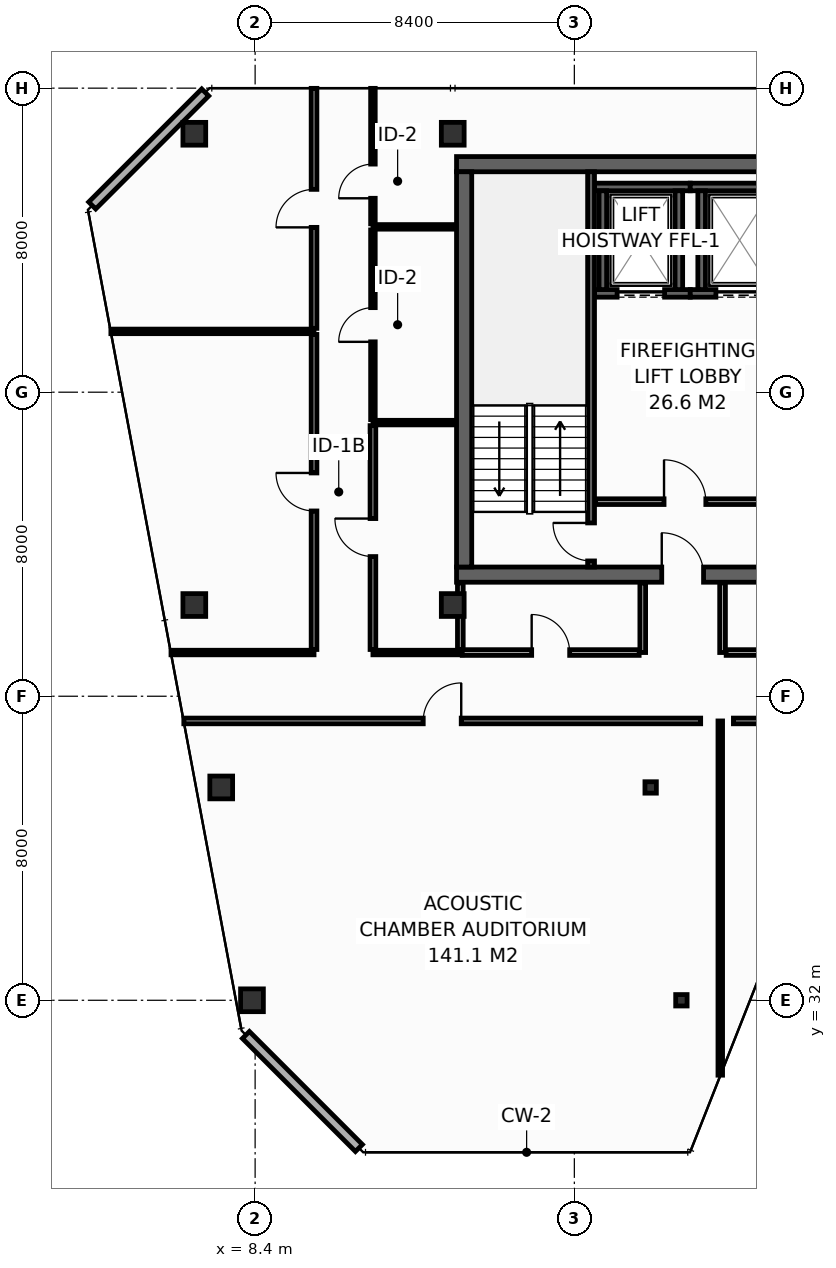
"""IFC4 building model, lengths in metres.
Left out: names, types, materials, properties, quantities, classifications, styles, units other than length and angle.
Written with IfcOpenShell. Run it as: python <this file> out.ifc"""

import sys

from ifc_helpers import new_model, si_unit, direction, frame, frame_2d, origin, origin_2d, place, context, subcontext, project, spatial, rectangle, hollow_rectangle, extrude, element, fill, save


model = new_model("IFC4")
c1 = context("Model", 3, precision=1e-05, world=origin(), true_north=direction((0.0, 1.0)))
c2 = subcontext(c1, "Body", "Model", "MODEL_VIEW")
j1 = project(units=[si_unit("LENGTHUNIT", "METRE"), si_unit("PLANEANGLEUNIT", "RADIAN")], contexts=[c1])
p1 = place(None, origin())
s1 = spatial("IfcSite", under=j1, at=p1, CompositionType="ELEMENT")
p2 = place(p1, origin())
s2 = spatial("IfcBuilding", under=s1, at=p2, CompositionType="ELEMENT")
p3 = place(p2, frame((0.0, 0.0, 291.4)))
s3 = spatial("IfcBuildingStorey", under=s2, at=p3, CompositionType="ELEMENT", Elevation=291.4)
p4 = place(p3, frame((13.7, 43.2, 0.0), z_axis=(0.0, 0.0, 1.0), x_axis=(1.0, 0.0, 0.0)))
e1 = element("IfcWall", 1, at=p4, inside=s3, PredefinedType="SHEAR", context=c2, shape_type="SweptSolid", body=[
    extrude(rectangle(XDim=32.5, YDim=0.4, at=frame_2d((16.25, 0.0))), origin(), (0.0, 0.0, 1.0), 3.55),
])
p5 = place(p4, frame((5.4, 0.0, 0.0)))
e2 = element("IfcOpeningElement", 2, at=p5, cuts=e1, PredefinedType="OPENING", context=c2, shape_type="SweptSolid", body=[
    extrude(rectangle(XDim=1.1, YDim=2.15, at=frame_2d((0.55, 1.075))), frame((0.0, 0.21, 0.0), z_axis=(0.0, -1.0, 0.0), x_axis=(1.0, 0.0, 0.0)), (0.0, 0.0, 1.0), 0.42),
])
p6 = place(p4, frame((25.6, 0.0, 0.0)))
e3 = element("IfcOpeningElement", 3, at=p6, cuts=e1, PredefinedType="OPENING", context=c2, shape_type="SweptSolid", body=[
    extrude(rectangle(XDim=1.1, YDim=2.15, at=frame_2d((0.55, 1.075))), frame((0.0, 0.21, 0.0), z_axis=(0.0, -1.0, 0.0), x_axis=(1.0, 0.0, 0.0)), (0.0, 0.0, 1.0), 0.42),
])
p7 = place(p3, frame((13.7, 54.0, 0.0), z_axis=(0.0, 0.0, 1.0), x_axis=(1.0, 0.0, 0.0)))
e4 = element("IfcWall", 4, at=p7, inside=s3, PredefinedType="SHEAR", context=c2, shape_type="SweptSolid", body=[
    extrude(rectangle(XDim=32.5, YDim=0.4, at=frame_2d((16.25, 0.0))), origin(), (0.0, 0.0, 1.0), 3.55),
])
p8 = place(p3, frame((13.9, 43.4, 0.0), z_axis=(0.0, 0.0, 1.0), x_axis=(0.0, 1.0, 0.0)))
e5 = element("IfcWall", 5, at=p8, inside=s3, PredefinedType="SHEAR", context=c2, shape_type="SweptSolid", body=[
    extrude(rectangle(XDim=10.4, YDim=0.4, at=frame_2d((5.2, 0.0))), origin(), (0.0, 0.0, 1.0), 3.55),
])
for number, where, z_axis, x_axis in (
    (6, (6.8, 54.8, 0.0), (0.0, 0.0, 1.0), (1.0, 0.0, 0.0)),
    (7, (13.6, 54.8, 0.0), (0.0, 0.0, 1.0), (1.0, 0.0, 0.0)),
    (8, (6.8, 42.4, 0.0), (0.0, 0.0, 1.0), (1.0, 0.0, 0.0)),
    (9, (13.6, 42.4, 0.0), (0.0, 0.0, 1.0), (1.0, 0.0, 0.0)),
    (10, (8.317, 32.0, 0.0), (0.0, 0.0, 1.0), (1.0, 0.0, 0.0)),
):
    element("IfcColumn", number, at=place(p3, frame(where, z_axis=z_axis, x_axis=x_axis)), inside=s3, PredefinedType="COLUMN", context=c2, shape_type="SweptSolid", body=[
        extrude(hollow_rectangle(XDim=0.6, YDim=0.6, WallThickness=0.028, at=origin_2d()), origin(), (0.0, 0.0, 1.0), 3.8),
    ])
p9 = place(p3, frame((19.617, 32.0, 0.0), z_axis=(0.0, 0.0, 1.0), x_axis=(1.0, 0.0, 0.0)))
e11 = element("IfcColumn", 11, at=p9, inside=s3, PredefinedType="COLUMN", context=c2, shape_type="SweptSolid", body=[
    extrude(hollow_rectangle(XDim=0.3, YDim=0.3, WallThickness=0.012, at=origin_2d()), origin(), (0.0, 0.0, 1.0), 3.8),
])
p10 = place(p3, frame((7.508, 37.6, 0.0), z_axis=(0.0, 0.0, 1.0), x_axis=(1.0, 0.0, 0.0)))
e12 = element("IfcColumn", 12, at=p10, inside=s3, PredefinedType="COLUMN", context=c2, shape_type="SweptSolid", body=[
    extrude(hollow_rectangle(XDim=0.6, YDim=0.6, WallThickness=0.028, at=origin_2d()), origin(), (0.0, 0.0, 1.0), 3.8),
])
p11 = place(p3, frame((18.808, 37.6, 0.0), z_axis=(0.0, 0.0, 1.0), x_axis=(1.0, 0.0, 0.0)))
e13 = element("IfcColumn", 13, at=p11, inside=s3, PredefinedType="COLUMN", context=c2, shape_type="SweptSolid", body=[
    extrude(hollow_rectangle(XDim=0.3, YDim=0.3, WallThickness=0.012, at=origin_2d()), origin(), (0.0, 0.0, 1.0), 3.8),
])
p12 = place(p3, frame((17.33, 50.6, 0.0), z_axis=(0.0, 0.0, 1.0), x_axis=(1.0, 0.0, 0.0)))
e14 = element("IfcWall", 14, at=p12, inside=s3, PredefinedType="SHEAR", context=c2, shape_type="SweptSolid", body=[
    extrude(rectangle(XDim=2.52, YDim=0.2, at=frame_2d((1.26, 0.0))), origin(), (0.0, 0.0, 1.0), 3.55),
])
p13 = place(p12, frame((0.595, 0.0, 0.0)))
e15 = element("IfcOpeningElement", 15, at=p13, cuts=e14, PredefinedType="OPENING", context=c2, shape_type="SweptSolid", body=[
    extrude(rectangle(XDim=1.25, YDim=2.3, at=frame_2d((0.625, 1.15))), frame((0.0, 0.11, 0.0), z_axis=(0.0, -1.0, 0.0), x_axis=(1.0, 0.0, 0.0)), (0.0, 0.0, 1.0), 0.22),
])
p14 = place(p3, frame((17.33, 53.4, 0.0), z_axis=(0.0, 0.0, 1.0), x_axis=(1.0, 0.0, 0.0)))
e16 = element("IfcWall", 16, at=p14, inside=s3, PredefinedType="SHEAR", context=c2, shape_type="SweptSolid", body=[
    extrude(rectangle(XDim=2.52, YDim=0.2, at=frame_2d((1.26, 0.0))), origin(), (0.0, 0.0, 1.0), 3.55),
])
for number, where, z_axis, x_axis in (
    (17, (17.55, 50.7, 0.0), (0.0, 0.0, 1.0), (0.0, 1.0, 0.0)),
    (18, (19.55, 50.7, 0.0), (0.0, 0.0, 1.0), (0.0, 1.0, 0.0)),
):
    element("IfcWall", number, at=place(p3, frame(where, z_axis=z_axis, x_axis=x_axis)), inside=s3, PredefinedType="SHEAR", context=c2, shape_type="SweptSolid", body=[
        extrude(rectangle(XDim=2.6, YDim=0.2, at=frame_2d((1.3, 0.0))), origin(), (0.0, 0.0, 1.0), 3.55),
    ])
p15 = place(p3, frame((19.85, 50.6, 0.0), z_axis=(0.0, 0.0, 1.0), x_axis=(1.0, 0.0, 0.0)))
e19 = element("IfcWall", 19, at=p15, inside=s3, PredefinedType="SHEAR", context=c2, shape_type="SweptSolid", body=[
    extrude(rectangle(XDim=2.65, YDim=0.2, at=frame_2d((1.325, 0.0))), origin(), (0.0, 0.0, 1.0), 3.55),
])
p16 = place(p15, frame((0.675, 0.0, 0.0)))
e20 = element("IfcOpeningElement", 20, at=p16, cuts=e19, PredefinedType="OPENING", context=c2, shape_type="SweptSolid", body=[
    extrude(rectangle(XDim=1.25, YDim=2.3, at=frame_2d((0.625, 1.15))), frame((0.0, 0.11, 0.0), z_axis=(0.0, -1.0, 0.0), x_axis=(1.0, 0.0, 0.0)), (0.0, 0.0, 1.0), 0.22),
])
p17 = place(p3, frame((19.85, 53.4, 0.0), z_axis=(0.0, 0.0, 1.0), x_axis=(1.0, 0.0, 0.0)))
e21 = element("IfcWall", 21, at=p17, inside=s3, PredefinedType="SHEAR", context=c2, shape_type="SweptSolid", body=[
    extrude(rectangle(XDim=2.65, YDim=0.2, at=frame_2d((1.325, 0.0))), origin(), (0.0, 0.0, 1.0), 3.55),
])
p18 = place(p3, frame((20.15, 50.7, 0.0), z_axis=(0.0, 0.0, 1.0), x_axis=(0.0, 1.0, 0.0)))
e22 = element("IfcWall", 22, at=p18, inside=s3, PredefinedType="SHEAR", context=c2, shape_type="SweptSolid", body=[
    extrude(rectangle(XDim=2.6, YDim=0.2, at=frame_2d((1.3, 0.0))), origin(), (0.0, 0.0, 1.0), 3.55),
])
p19 = place(p3, frame((17.24, 43.4, 0.0), z_axis=(0.0, 0.0, 1.0), x_axis=(0.0, 1.0, 0.0)))
e23 = element("IfcWall", 23, at=p19, inside=s3, PredefinedType="SHEAR", context=c2, shape_type="SweptSolid", body=[
    extrude(rectangle(XDim=10.4, YDim=0.18, at=frame_2d((5.2, 0.0))), origin(), (0.0, 0.0, 1.0), 3.55),
])
p20 = place(p19, frame((0.16, 0.0, 0.0)))
e24 = element("IfcOpeningElement", 24, at=p20, cuts=e23, PredefinedType="OPENING", context=c2, shape_type="SweptSolid", body=[
    extrude(rectangle(XDim=1.0, YDim=2.15, at=frame_2d((0.5, 1.075))), frame((0.0, 0.1, 0.0), z_axis=(0.0, -1.0, 0.0), x_axis=(1.0, 0.0, 0.0)), (0.0, 0.0, 1.0), 0.2),
])
p21 = place(p3, frame((17.36, 45.12, 0.0), z_axis=(0.0, 0.0, 1.0), x_axis=(1.0, 0.0, 0.0)))
e25 = element("IfcWall", 25, at=p21, inside=s3, PredefinedType="PARTITIONING", context=c2, shape_type="SweptSolid", body=[
    extrude(rectangle(XDim=5.14, YDim=0.15, at=frame_2d((2.57, 0.0))), origin(), (0.0, 0.0, 1.0), 3.55),
])
p22 = place(p21, frame((1.8, 0.0, 0.0)))
e26 = element("IfcOpeningElement", 26, at=p22, cuts=e25, PredefinedType="OPENING", context=c2, shape_type="SweptSolid", body=[
    extrude(rectangle(XDim=1.1, YDim=2.15, at=frame_2d((0.55, 1.075))), frame((0.0, 0.085, 0.0), z_axis=(0.0, -1.0, 0.0), x_axis=(1.0, 0.0, 0.0)), (0.0, 0.0, 1.0), 0.17),
])
for number, where, z_axis, x_axis in (
    (27, (8.157, 31.087, 0.0), (0.0, 0.0, 1.0), (0.707, -0.707, 0.0)),
    (28, (7.087, 55.887, 0.0), (0.0, 0.0, 1.0), (-0.707, -0.707, 0.0)),
):
    element("IfcWall", number, at=place(p3, frame(where, z_axis=z_axis, x_axis=x_axis)), inside=s3, PredefinedType="STANDARD", context=c2, shape_type="SweptSolid", body=[
        extrude(rectangle(XDim=4.206, YDim=0.26, at=frame_2d((2.103, 0.0))), origin(), (0.0, 0.0, 1.0), 3.55),
    ])
p23 = place(p3, frame((6.186, 41.15, 0.0), z_axis=(0.0, 0.0, 1.0), x_axis=(1.0, 0.0, 0.0)))
e29 = element("IfcWall", 29, at=p23, inside=s3, PredefinedType="PARTITIONING", context=c2, shape_type="SweptSolid", body=[
    extrude(rectangle(XDim=3.764, YDim=0.12, at=frame_2d((1.882, 0.0))), origin(), (0.0, 0.0, 1.0), 3.085),
])
p24 = place(p3, frame((11.5, 41.15, 0.0), z_axis=(0.0, 0.0, 1.0), x_axis=(1.0, 0.0, 0.0)))
e30 = element("IfcWall", 30, at=p24, inside=s3, PredefinedType="PARTITIONING", context=c2, shape_type="SweptSolid", body=[
    extrude(rectangle(XDim=2.35, YDim=0.12, at=frame_2d((1.175, 0.0))), origin(), (0.0, 0.0, 1.0), 3.55),
])
p25 = place(p3, frame((11.5, 52.35, 0.0), z_axis=(0.0, 0.0, 1.0), x_axis=(1.0, 0.0, 0.0)))
e31 = element("IfcWall", 31, at=p25, inside=s3, PredefinedType="PARTITIONING", context=c2, shape_type="SweptSolid", body=[
    extrude(rectangle(XDim=2.18, YDim=0.12, at=frame_2d((1.09, 0.0))), origin(), (0.0, 0.0, 1.0), 3.55),
])
p26 = place(p3, frame((11.5, 52.43, 0.0), z_axis=(0.0, 0.0, 1.0), x_axis=(0.0, 1.0, 0.0)))
e32 = element("IfcWall", 32, at=p26, inside=s3, PredefinedType="PARTITIONING", context=c2, shape_type="SweptSolid", body=[
    extrude(rectangle(XDim=3.565, YDim=0.12, at=frame_2d((1.783, 0.0))), origin(), (0.0, 0.0, 1.0), 2.935),
])
p27 = place(p26, frame((0.672, 0.0, 0.0)))
e33 = element("IfcOpeningElement", 33, at=p27, cuts=e32, PredefinedType="OPENING", context=c2, shape_type="SweptSolid", body=[
    extrude(rectangle(XDim=0.9, YDim=2.1, at=frame_2d((0.45, 1.05))), frame((0.0, 0.07, 0.0), z_axis=(0.0, -1.0, 0.0), x_axis=(1.0, 0.0, 0.0)), (0.0, 0.0, 1.0), 0.14),
])
p28 = place(p3, frame((4.604, 49.6, 0.0), z_axis=(0.0, 0.0, 1.0), x_axis=(1.0, 0.0, 0.0)))
e34 = element("IfcWall", 34, at=p28, inside=s3, PredefinedType="PARTITIONING", context=c2, shape_type="SweptSolid", body=[
    extrude(rectangle(XDim=5.346, YDim=0.12, at=frame_2d((2.673, 0.0))), origin(), (0.0, 0.0, 1.0), 2.947),
])
p29 = place(p3, frame((9.95, 41.23, 0.0), z_axis=(0.0, 0.0, 1.0), x_axis=(0.0, 1.0, 0.0)))
e35 = element("IfcWall", 35, at=p29, inside=s3, PredefinedType="PARTITIONING", context=c2, shape_type="SweptSolid", body=[
    extrude(rectangle(XDim=8.29, YDim=0.15, at=frame_2d((4.145, 0.0))), origin(), (0.0, 0.0, 1.0), 2.947),
])
p30 = place(p29, frame((3.645, 0.0, 0.0)))
e36 = element("IfcOpeningElement", 36, at=p30, cuts=e35, PredefinedType="OPENING", context=c2, shape_type="SweptSolid", body=[
    extrude(rectangle(XDim=1.0, YDim=2.15, at=frame_2d((0.5, 1.075))), frame((0.0, 0.085, 0.0), z_axis=(0.0, -1.0, 0.0), x_axis=(1.0, 0.0, 0.0)), (0.0, 0.0, 1.0), 0.17),
])
p31 = place(p3, frame((9.95, 49.68, 0.0), z_axis=(0.0, 0.0, 1.0), x_axis=(0.0, 1.0, 0.0)))
e37 = element("IfcWall", 37, at=p31, inside=s3, PredefinedType="PARTITIONING", context=c2, shape_type="SweptSolid", body=[
    extrude(rectangle(XDim=6.315, YDim=0.15, at=frame_2d((3.158, 0.0))), origin(), (0.0, 0.0, 1.0), 2.935),
])
p32 = place(p31, frame((2.657, 0.0, 0.0)))
e38 = element("IfcOpeningElement", 38, at=p32, cuts=e37, PredefinedType="OPENING", context=c2, shape_type="SweptSolid", body=[
    extrude(rectangle(XDim=1.0, YDim=2.15, at=frame_2d((0.5, 1.075))), frame((0.0, 0.085, 0.0), z_axis=(0.0, -1.0, 0.0), x_axis=(1.0, 0.0, 0.0)), (0.0, 0.0, 1.0), 0.17),
])
p33 = place(p3, frame((11.5, 47.2, 0.0), z_axis=(0.0, 0.0, 1.0), x_axis=(1.0, 0.0, 0.0)))
e39 = element("IfcWall", 39, at=p33, inside=s3, PredefinedType="PARTITIONING", context=c2, shape_type="SweptSolid", body=[
    extrude(rectangle(XDim=2.18, YDim=0.12, at=frame_2d((1.09, 0.0))), origin(), (0.0, 0.0, 1.0), 3.55),
])
p34 = place(p3, frame((11.5, 41.23, 0.0), z_axis=(0.0, 0.0, 1.0), x_axis=(0.0, 1.0, 0.0)))
e40 = element("IfcWall", 40, at=p34, inside=s3, PredefinedType="PARTITIONING", context=c2, shape_type="SweptSolid", body=[
    extrude(rectangle(XDim=5.89, YDim=0.15, at=frame_2d((2.945, 0.0))), origin(), (0.0, 0.0, 1.0), 2.947),
])
p35 = place(p34, frame((2.445, 0.0, 0.0)))
e41 = element("IfcOpeningElement", 41, at=p35, cuts=e40, PredefinedType="OPENING", context=c2, shape_type="SweptSolid", body=[
    extrude(rectangle(XDim=1.0, YDim=2.15, at=frame_2d((0.5, 1.075))), frame((0.0, 0.085, 0.0), z_axis=(0.0, -1.0, 0.0), x_axis=(1.0, 0.0, 0.0)), (0.0, 0.0, 1.0), 0.17),
])
p36 = place(p3, frame((11.5, 47.28, 0.0), z_axis=(0.0, 0.0, 1.0), x_axis=(0.0, 1.0, 0.0)))
e42 = element("IfcWall", 42, at=p36, inside=s3, PredefinedType="PARTITIONING", context=c2, shape_type="SweptSolid", body=[
    extrude(rectangle(XDim=4.99, YDim=0.12, at=frame_2d((2.495, 0.0))), origin(), (0.0, 0.0, 1.0), 3.55),
])
p37 = place(p36, frame((2.045, 0.0, 0.0)))
e43 = element("IfcOpeningElement", 43, at=p37, cuts=e42, PredefinedType="OPENING", context=c2, shape_type="SweptSolid", body=[
    extrude(rectangle(XDim=0.9, YDim=2.1, at=frame_2d((0.45, 1.05))), frame((0.0, 0.07, 0.0), z_axis=(0.0, -1.0, 0.0), x_axis=(1.0, 0.0, 0.0)), (0.0, 0.0, 1.0), 0.14),
])
p38 = place(p3, frame((13.8, 41.23, 0.0), z_axis=(0.0, 0.0, 1.0), x_axis=(0.0, 1.0, 0.0)))
e44 = element("IfcWall", 44, at=p38, inside=s3, PredefinedType="PARTITIONING", context=c2, shape_type="SweptSolid", body=[
    extrude(rectangle(XDim=1.75, YDim=0.15, at=frame_2d((0.875, 0.0))), origin(), (0.0, 0.0, 1.0), 3.55),
])
for number, where, z_axis, x_axis in (
    (45, (18.6, 41.15, 0.0), (0.0, 0.0, 1.0), (0.0, 1.0, 0.0)),
    (46, (20.7, 41.15, 0.0), (0.0, 0.0, 1.0), (0.0, 1.0, 0.0)),
):
    element("IfcWall", number, at=place(p3, frame(where, z_axis=z_axis, x_axis=x_axis)), inside=s3, PredefinedType="PARTITIONING", context=c2, shape_type="SweptSolid", body=[
        extrude(rectangle(XDim=1.83, YDim=0.15, at=frame_2d((0.915, 0.0))), origin(), (0.0, 0.0, 1.0), 3.55),
    ])
p39 = place(p3, frame((13.85, 41.15, 0.0), z_axis=(0.0, 0.0, 1.0), x_axis=(1.0, 0.0, 0.0)))
e47 = element("IfcWall", 47, at=p39, inside=s3, PredefinedType="PARTITIONING", context=c2, shape_type="SweptSolid", body=[
    extrude(rectangle(XDim=4.655, YDim=0.15, at=frame_2d((2.327, 0.0))), origin(), (0.0, 0.0, 1.0), 3.55),
])
p40 = place(p39, frame((1.827, 0.0, 0.0)))
e48 = element("IfcOpeningElement", 48, at=p40, cuts=e47, PredefinedType="OPENING", context=c2, shape_type="SweptSolid", body=[
    extrude(rectangle(XDim=1.0, YDim=2.15, at=frame_2d((0.5, 1.075))), frame((0.0, 0.085, 0.0), z_axis=(0.0, -1.0, 0.0), x_axis=(1.0, 0.0, 0.0)), (0.0, 0.0, 1.0), 0.17),
])
p41 = place(p3, frame((20.795, 41.15, 0.0), z_axis=(0.0, 0.0, 1.0), x_axis=(1.0, 0.0, 0.0)))
e49 = element("IfcWall", 49, at=p41, inside=s3, PredefinedType="PARTITIONING", context=c2, shape_type="SweptSolid", body=[
    extrude(rectangle(XDim=1.126, YDim=0.15, at=frame_2d((0.563, 0.0))), origin(), (0.0, 0.0, 1.0), 3.55),
])
p42 = place(p3, frame((20.64, 30.029, 0.0), z_axis=(0.0, 0.0, 1.0), x_axis=(0.0, 1.0, 0.0)))
e50 = element("IfcWall", 50, at=p42, inside=s3, PredefinedType="PARTITIONING", context=c2, shape_type="SweptSolid", body=[
    extrude(rectangle(XDim=9.321, YDim=0.12, at=frame_2d((4.661, 0.0))), origin(), (0.0, 0.0, 1.0), 2.135),
])
p43 = place(p3, frame((6.523, 39.35, 0.0), z_axis=(0.0, 0.0, 1.0), x_axis=(1.0, 0.0, 0.0)))
e51 = element("IfcWall", 51, at=p43, inside=s3, PredefinedType="PARTITIONING", context=c2, shape_type="SweptSolid", body=[
    extrude(rectangle(XDim=13.601, YDim=0.15, at=frame_2d((6.8, 0.0))), origin(), (0.0, 0.0, 1.0), 3.085),
])
p44 = place(p43, frame((6.3, 0.0, 0.0)))
e52 = element("IfcOpeningElement", 52, at=p44, cuts=e51, PredefinedType="OPENING", context=c2, shape_type="SweptSolid", body=[
    extrude(rectangle(XDim=1.0, YDim=2.15, at=frame_2d((0.5, 1.075))), frame((0.0, 0.085, 0.0), z_axis=(0.0, -1.0, 0.0), x_axis=(1.0, 0.0, 0.0)), (0.0, 0.0, 1.0), 0.17),
])
p45 = place(p3, frame((20.986, 39.35, 0.0), z_axis=(0.0, 0.0, 1.0), x_axis=(1.0, 0.0, 0.0)))
e53 = element("IfcWall", 53, at=p45, inside=s3, PredefinedType="PARTITIONING", context=c2, shape_type="SweptSolid", body=[
    extrude(rectangle(XDim=11.266, YDim=0.15, at=frame_2d((5.633, 0.0))), origin(), (0.0, 0.0, 1.0), 3.55),
])
p46 = place(p45, frame((5.133, 0.0, 0.0)))
e54 = element("IfcOpeningElement", 54, at=p46, cuts=e53, PredefinedType="OPENING", context=c2, shape_type="SweptSolid", body=[
    extrude(rectangle(XDim=1.0, YDim=2.15, at=frame_2d((0.5, 1.075))), frame((0.0, 0.085, 0.0), z_axis=(0.0, -1.0, 0.0), x_axis=(1.0, 0.0, 0.0)), (0.0, 0.0, 1.0), 0.17),
])
p47 = place(p13, origin())
e55 = element("IfcDoor", 55, at=p47, inside=s3, OperationType="SLIDING_TO_LEFT", PredefinedType="DOOR", context=c2, shape_type="SweptSolid", body=[
    extrude(rectangle(XDim=1.25, YDim=2.3, at=frame_2d((0.625, 1.15))), frame((0.0, 0.025, 0.0), z_axis=(0.0, -1.0, 0.0), x_axis=(1.0, 0.0, 0.0)), (0.0, 0.0, 1.0), 0.05),
])
fill(e15, e55)
p48 = place(p16, origin())
e56 = element("IfcDoor", 56, at=p48, inside=s3, OperationType="SLIDING_TO_LEFT", PredefinedType="DOOR", context=c2, shape_type="SweptSolid", body=[
    extrude(rectangle(XDim=1.25, YDim=2.3, at=frame_2d((0.625, 1.15))), frame((0.0, 0.025, 0.0), z_axis=(0.0, -1.0, 0.0), x_axis=(1.0, 0.0, 0.0)), (0.0, 0.0, 1.0), 0.05),
])
fill(e20, e56)
p49 = place(p20, origin())
e57 = element("IfcDoor", 57, at=p49, inside=s3, OperationType="SINGLE_SWING_RIGHT", PredefinedType="DOOR", context=c2, shape_type="SweptSolid", body=[
    extrude(rectangle(XDim=1.0, YDim=2.15, at=frame_2d((0.5, 1.075))), frame((0.0, 0.025, 0.0), z_axis=(0.0, -1.0, 0.0), x_axis=(1.0, 0.0, 0.0)), (0.0, 0.0, 1.0), 0.05),
])
fill(e24, e57)
p50 = place(p22, origin())
e58 = element("IfcDoor", 58, at=p50, inside=s3, OperationType="SINGLE_SWING_LEFT", PredefinedType="DOOR", context=c2, shape_type="SweptSolid", body=[
    extrude(rectangle(XDim=1.1, YDim=2.15, at=frame_2d((0.55, 1.075))), frame((0.0, 0.025, 0.0), z_axis=(0.0, -1.0, 0.0), x_axis=(1.0, 0.0, 0.0)), (0.0, 0.0, 1.0), 0.05),
])
fill(e26, e58)
p51 = place(p5, origin())
e59 = element("IfcDoor", 59, at=p51, inside=s3, OperationType="SINGLE_SWING_LEFT", PredefinedType="DOOR", context=c2, shape_type="SweptSolid", body=[
    extrude(rectangle(XDim=1.1, YDim=2.15, at=frame_2d((0.55, 1.075))), frame((0.0, 0.025, 0.0), z_axis=(0.0, -1.0, 0.0), x_axis=(1.0, 0.0, 0.0)), (0.0, 0.0, 1.0), 0.05),
])
fill(e2, e59)
p52 = place(p27, origin())
e60 = element("IfcDoor", 60, at=p52, inside=s3, OperationType="SINGLE_SWING_LEFT", PredefinedType="DOOR", context=c2, shape_type="SweptSolid", body=[
    extrude(rectangle(XDim=0.9, YDim=2.1, at=frame_2d((0.45, 1.05))), frame((0.0, 0.025, 0.0), z_axis=(0.0, -1.0, 0.0), x_axis=(1.0, 0.0, 0.0)), (0.0, 0.0, 1.0), 0.05),
])
fill(e33, e60)
p53 = place(p30, origin())
e61 = element("IfcDoor", 61, at=p53, inside=s3, OperationType="SINGLE_SWING_RIGHT", PredefinedType="DOOR", context=c2, shape_type="SweptSolid", body=[
    extrude(rectangle(XDim=1.0, YDim=2.15, at=frame_2d((0.5, 1.075))), frame((0.0, 0.025, 0.0), z_axis=(0.0, -1.0, 0.0), x_axis=(1.0, 0.0, 0.0)), (0.0, 0.0, 1.0), 0.05),
])
fill(e36, e61)
p54 = place(p32, origin())
e62 = element("IfcDoor", 62, at=p54, inside=s3, OperationType="SINGLE_SWING_LEFT", PredefinedType="DOOR", context=c2, shape_type="SweptSolid", body=[
    extrude(rectangle(XDim=1.0, YDim=2.15, at=frame_2d((0.5, 1.075))), frame((0.0, 0.025, 0.0), z_axis=(0.0, -1.0, 0.0), x_axis=(1.0, 0.0, 0.0)), (0.0, 0.0, 1.0), 0.05),
])
fill(e38, e62)
p55 = place(p35, origin())
e63 = element("IfcDoor", 63, at=p55, inside=s3, OperationType="SINGLE_SWING_RIGHT", PredefinedType="DOOR", context=c2, shape_type="SweptSolid", body=[
    extrude(rectangle(XDim=1.0, YDim=2.15, at=frame_2d((0.5, 1.075))), frame((0.0, 0.025, 0.0), z_axis=(0.0, -1.0, 0.0), x_axis=(1.0, 0.0, 0.0)), (0.0, 0.0, 1.0), 0.05),
])
fill(e41, e63)
p56 = place(p37, origin())
e64 = element("IfcDoor", 64, at=p56, inside=s3, OperationType="SINGLE_SWING_LEFT", PredefinedType="DOOR", context=c2, shape_type="SweptSolid", body=[
    extrude(rectangle(XDim=0.9, YDim=2.1, at=frame_2d((0.45, 1.05))), frame((0.0, 0.025, 0.0), z_axis=(0.0, -1.0, 0.0), x_axis=(1.0, 0.0, 0.0)), (0.0, 0.0, 1.0), 0.05),
])
fill(e43, e64)
p57 = place(p40, origin())
e65 = element("IfcDoor", 65, at=p57, inside=s3, OperationType="SINGLE_SWING_LEFT", PredefinedType="DOOR", context=c2, shape_type="SweptSolid", body=[
    extrude(rectangle(XDim=1.0, YDim=2.15, at=frame_2d((0.5, 1.075))), frame((0.0, 0.025, 0.0), z_axis=(0.0, -1.0, 0.0), x_axis=(1.0, 0.0, 0.0)), (0.0, 0.0, 1.0), 0.05),
])
fill(e48, e65)
p58 = place(p44, origin())
e66 = element("IfcDoor", 66, at=p58, inside=s3, OperationType="SINGLE_SWING_RIGHT", PredefinedType="DOOR", context=c2, shape_type="SweptSolid", body=[
    extrude(rectangle(XDim=1.0, YDim=2.15, at=frame_2d((0.5, 1.075))), frame((0.0, 0.025, 0.0), z_axis=(0.0, -1.0, 0.0), x_axis=(1.0, 0.0, 0.0)), (0.0, 0.0, 1.0), 0.05),
])
fill(e52, e66)
save(model, sys.argv[1])
